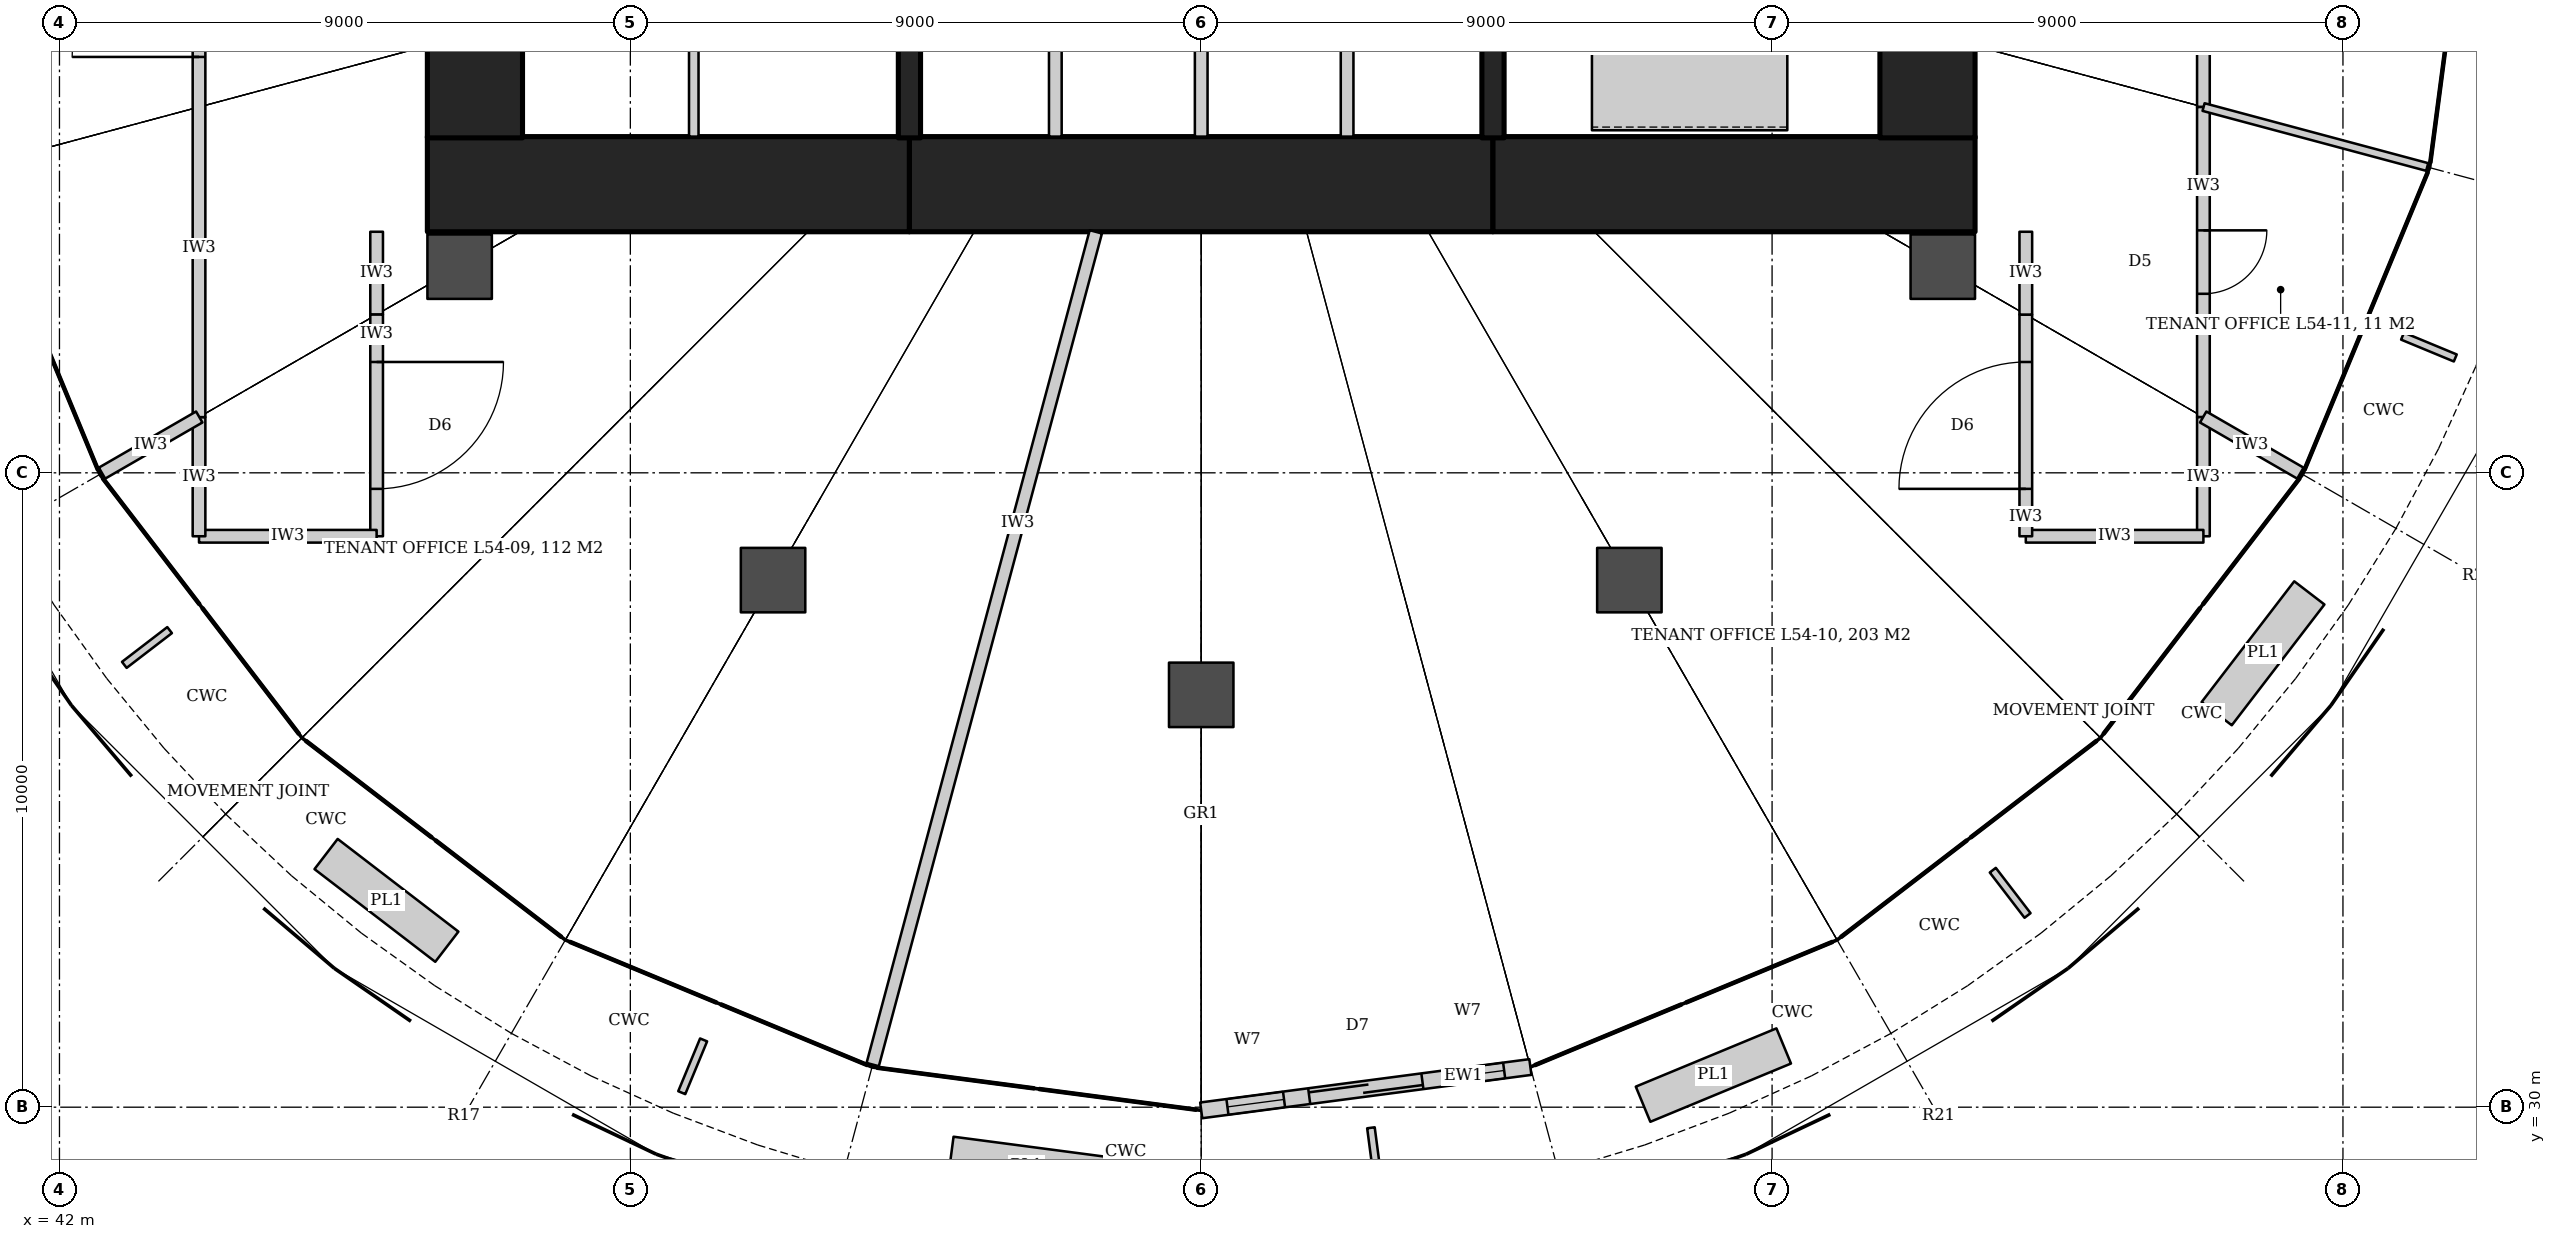
"""IFC4 building model, lengths in metres.
Left out: names, types, materials, properties, quantities, classifications, styles, units other than length and angle.
Written with IfcOpenShell. Run it as: python <this file> out.ifc"""

import sys

from ifc_helpers import new_model, si_unit, direction, frame, frame_2d, origin, origin_2d, place, context, subcontext, project, spatial, rectangle, hollow_circle, extrude, element, fill, save


model = new_model("IFC4")
c1 = context("Model", 3, precision=1e-05, world=origin(), true_north=direction((0.0, 1.0)))
c2 = subcontext(c1, "Body", "Model", "MODEL_VIEW")
j1 = project(units=[si_unit("LENGTHUNIT", "METRE"), si_unit("PLANEANGLEUNIT", "RADIAN")], contexts=[c1])
p1 = place(None, origin())
s1 = spatial("IfcSite", under=j1, at=p1, CompositionType="ELEMENT")
p2 = place(p1, origin())
s2 = spatial("IfcBuilding", under=s1, at=p2, CompositionType="ELEMENT")
p3 = place(p2, frame((0.0, 0.0, 227.6)))
s3 = spatial("IfcBuildingStorey", under=s2, at=p3, CompositionType="ELEMENT", Elevation=227.6)
p4 = place(p3, frame((47.8, 44.55, 0.0), z_axis=(0.0, 0.0, 1.0), x_axis=(1.0, 0.0, 0.0)))
e1 = element("IfcWall", 1, at=p4, inside=s3, PredefinedType="SHEAR", context=c2, shape_type="SweptSolid", body=[
    extrude(rectangle(XDim=7.6, YDim=1.5, at=frame_2d((3.8, 0.0))), origin(), (0.0, 0.0, 1.0), 4.2),
])
p5 = place(p3, frame((55.4, 44.55, 0.0), z_axis=(0.0, 0.0, 1.0), x_axis=(1.0, 0.0, 0.0)))
e2 = element("IfcWall", 2, at=p5, inside=s3, PredefinedType="SHEAR", context=c2, shape_type="SweptSolid", body=[
    extrude(rectangle(XDim=9.2, YDim=1.5, at=frame_2d((4.6, 0.0))), origin(), (0.0, 0.0, 1.0), 4.2),
])
p6 = place(p3, frame((64.6, 44.55, 0.0), z_axis=(0.0, 0.0, 1.0), x_axis=(1.0, 0.0, 0.0)))
e3 = element("IfcWall", 3, at=p6, inside=s3, PredefinedType="SHEAR", context=c2, shape_type="SweptSolid", body=[
    extrude(rectangle(XDim=7.6, YDim=1.5, at=frame_2d((3.8, 0.0))), origin(), (0.0, 0.0, 1.0), 4.2),
])
for number, where, z_axis, x_axis in (
    (4, (71.45, 45.28, 0.0), (0.0, 0.0, 1.0), (0.0, 1.0, 0.0)),
    (5, (48.55, 45.28, 0.0), (0.0, 0.0, 1.0), (0.0, 1.0, 0.0)),
):
    element("IfcWall", number, at=place(p3, frame(where, z_axis=z_axis, x_axis=x_axis)), inside=s3, PredefinedType="SHEAR", context=c2, shape_type="SweptSolid", body=[
        extrude(rectangle(XDim=3.22, YDim=1.5, at=frame_2d((1.61, 0.0))), origin(), (0.0, 0.0, 1.0), 4.2),
    ])
for number, where, z_axis, x_axis in (
    (6, (55.4, 48.345, 0.0), (0.0, 0.0, 1.0), (0.0, -1.0, 0.0)),
    (7, (64.6, 48.345, 0.0), (0.0, 0.0, 1.0), (0.0, -1.0, 0.0)),
):
    element("IfcWall", number, at=place(p3, frame(where, z_axis=z_axis, x_axis=x_axis)), inside=s3, PredefinedType="SHEAR", context=c2, shape_type="SweptSolid", body=[
        extrude(rectangle(XDim=3.065, YDim=0.35, at=frame_2d((1.532, 0.0))), origin(), (0.0, 0.0, 1.0), 4.2),
    ])
for number, where, z_axis, x_axis in (
    (8, (48.309, 43.25, 0.0), (0.0, 0.0, 1.0), (1.0, 0.0, 0.0)),
    (9, (53.25, 38.309, 0.0), (0.0, 0.0, 1.0), (1.0, 0.0, 0.0)),
    (10, (60.0, 36.5, 0.0), (0.0, 0.0, 1.0), (1.0, 0.0, 0.0)),
    (11, (66.75, 38.309, 0.0), (0.0, 0.0, 1.0), (1.0, 0.0, 0.0)),
    (12, (71.691, 43.25, 0.0), (0.0, 0.0, 1.0), (1.0, 0.0, 0.0)),
):
    element("IfcColumn", number, at=place(p3, frame(where, z_axis=z_axis, x_axis=x_axis)), inside=s3, PredefinedType="COLUMN", context=c2, shape_type="SweptSolid", body=[
        extrude(hollow_circle(Radius=0.508, WallThickness=0.05, at=origin_2d()), origin(), (0.0, 0.0, 1.0), 4.2),
    ])
p7 = place(p3, frame((75.8, 50.0, 0.0), z_axis=(0.0, 0.0, 1.0), x_axis=(0.0, -1.0, 0.0)))
e13 = element("IfcWall", 13, at=p7, inside=s3, PredefinedType="PARTITIONING", context=c2, shape_type="SweptSolid", body=[
    extrude(rectangle(XDim=4.234, YDim=0.2, at=frame_2d((2.117, 0.0))), origin(), (0.0, 0.0, 1.0), 3.02),
])
p8 = place(p7, frame((1.617, 0.0, 0.0)))
e14 = element("IfcOpeningElement", 14, at=p8, cuts=e13, PredefinedType="OPENING", context=c2, shape_type="SweptSolid", body=[
    extrude(rectangle(XDim=1.0, YDim=2.4, at=frame_2d((0.5, 1.2))), frame((0.0, 0.11, 0.0), z_axis=(0.0, -1.0, 0.0), x_axis=(1.0, 0.0, 0.0)), (0.0, 0.0, 1.0), 0.22),
])
p9 = place(p3, frame((75.8, 45.766, 0.0), z_axis=(0.0, 0.0, 1.0), x_axis=(0.0, -1.0, 0.0)))
e15 = element("IfcWall", 15, at=p9, inside=s3, PredefinedType="PARTITIONING", context=c2, shape_type="SweptSolid", body=[
    extrude(rectangle(XDim=4.888, YDim=0.2, at=frame_2d((2.444, 0.0))), origin(), (0.0, 0.0, 1.0), 3.02),
])
p10 = place(p9, frame((1.944, 0.0, 0.0)))
e16 = element("IfcOpeningElement", 16, at=p10, cuts=e15, PredefinedType="OPENING", context=c2, shape_type="SweptSolid", body=[
    extrude(rectangle(XDim=1.0, YDim=2.1, at=frame_2d((0.5, 1.05))), frame((0.0, 0.11, 0.0), z_axis=(0.0, -1.0, 0.0), x_axis=(1.0, 0.0, 0.0)), (0.0, 0.0, 1.0), 0.22),
])
p11 = place(p3, frame((75.8, 40.878, 0.0), z_axis=(0.0, 0.0, 1.0), x_axis=(0.0, -1.0, 0.0)))
e17 = element("IfcWall", 17, at=p11, inside=s3, PredefinedType="PARTITIONING", context=c2, shape_type="SweptSolid", body=[
    extrude(rectangle(XDim=1.878, YDim=0.2, at=frame_2d((0.939, 0.0))), origin(), (0.0, 0.0, 1.0), 3.02),
])
p12 = place(p3, frame((75.8, 39.0, 0.0), z_axis=(0.0, 0.0, 1.0), x_axis=(-1.0, 0.0, 0.0)))
e18 = element("IfcWall", 18, at=p12, inside=s3, PredefinedType="PARTITIONING", context=c2, shape_type="SweptSolid", body=[
    extrude(rectangle(XDim=2.8, YDim=0.2, at=frame_2d((1.4, 0.0))), origin(), (0.0, 0.0, 1.0), 3.04),
])
p13 = place(p3, frame((73.0, 39.0, 0.0), z_axis=(0.0, 0.0, 1.0), x_axis=(0.0, 1.0, 0.0)))
e19 = element("IfcWall", 19, at=p13, inside=s3, PredefinedType="PARTITIONING", context=c2, shape_type="SweptSolid", body=[
    extrude(rectangle(XDim=3.494, YDim=0.2, at=frame_2d((1.747, 0.0))), origin(), (0.0, 0.0, 1.0), 3.02),
])
p14 = place(p13, frame((0.747, 0.0, 0.0)))
e20 = element("IfcOpeningElement", 20, at=p14, cuts=e19, PredefinedType="OPENING", context=c2, shape_type="SweptSolid", body=[
    extrude(rectangle(XDim=2.0, YDim=2.1, at=frame_2d((1.0, 1.05))), frame((0.0, 0.11, 0.0), z_axis=(0.0, -1.0, 0.0), x_axis=(1.0, 0.0, 0.0)), (0.0, 0.0, 1.0), 0.22),
])
for number, where, z_axis, x_axis in (
    (21, (73.0, 42.494, 0.0), (0.0, 0.0, 1.0), (0.0, 1.0, 0.0)),
    (22, (47.0, 43.8, 0.0), (0.0, 0.0, 1.0), (0.0, -1.0, 0.0)),
):
    element("IfcWall", number, at=place(p3, frame(where, z_axis=z_axis, x_axis=x_axis)), inside=s3, PredefinedType="PARTITIONING", context=c2, shape_type="SweptSolid", body=[
        extrude(rectangle(XDim=1.306, YDim=0.2, at=frame_2d((0.653, 0.0))), origin(), (0.0, 0.0, 1.0), 3.02),
    ])
p15 = place(p3, frame((47.0, 42.494, 0.0), z_axis=(0.0, 0.0, 1.0), x_axis=(0.0, -1.0, 0.0)))
e23 = element("IfcWall", 23, at=p15, inside=s3, PredefinedType="PARTITIONING", context=c2, shape_type="SweptSolid", body=[
    extrude(rectangle(XDim=3.494, YDim=0.2, at=frame_2d((1.747, 0.0))), origin(), (0.0, 0.0, 1.0), 3.02),
])
p16 = place(p15, frame((0.747, 0.0, 0.0)))
e24 = element("IfcOpeningElement", 24, at=p16, cuts=e23, PredefinedType="OPENING", context=c2, shape_type="SweptSolid", body=[
    extrude(rectangle(XDim=2.0, YDim=2.1, at=frame_2d((1.0, 1.05))), frame((0.0, 0.11, 0.0), z_axis=(0.0, -1.0, 0.0), x_axis=(1.0, 0.0, 0.0)), (0.0, 0.0, 1.0), 0.22),
])
p17 = place(p3, frame((47.0, 39.0, 0.0), z_axis=(0.0, 0.0, 1.0), x_axis=(-1.0, 0.0, 0.0)))
e25 = element("IfcWall", 25, at=p17, inside=s3, PredefinedType="PARTITIONING", context=c2, shape_type="SweptSolid", body=[
    extrude(rectangle(XDim=2.8, YDim=0.2, at=frame_2d((1.4, 0.0))), origin(), (0.0, 0.0, 1.0), 3.04),
])
p18 = place(p3, frame((44.2, 39.0, 0.0), z_axis=(0.0, 0.0, 1.0), x_axis=(0.0, 1.0, 0.0)))
e26 = element("IfcWall", 26, at=p18, inside=s3, PredefinedType="PARTITIONING", context=c2, shape_type="SweptSolid", body=[
    extrude(rectangle(XDim=1.878, YDim=0.2, at=frame_2d((0.939, 0.0))), origin(), (0.0, 0.0, 1.0), 3.02),
])
p19 = place(p3, frame((44.2, 40.878, 0.0), z_axis=(0.0, 0.0, 1.0), x_axis=(0.0, 1.0, 0.0)))
e27 = element("IfcWall", 27, at=p19, inside=s3, PredefinedType="PARTITIONING", context=c2, shape_type="SweptSolid", body=[
    extrude(rectangle(XDim=13.356, YDim=0.2, at=frame_2d((6.678, 0.0))), origin(), (0.0, 0.0, 1.0), 3.02),
])
p20 = place(p19, frame((5.678, 0.0, 0.0)))
e28 = element("IfcOpeningElement", 28, at=p20, cuts=e27, PredefinedType="OPENING", context=c2, shape_type="SweptSolid", body=[
    extrude(rectangle(XDim=2.0, YDim=2.1, at=frame_2d((1.0, 1.05))), frame((0.0, 0.11, 0.0), z_axis=(0.0, -1.0, 0.0), x_axis=(1.0, 0.0, 0.0)), (0.0, 0.0, 1.0), 0.22),
])
p21 = place(p3, frame((44.204, 40.88, 0.0), z_axis=(0.0, 0.0, 1.0), x_axis=(-0.866047089031, -0.499962438169, 0.0)))
e29 = element("IfcWall", 29, at=p21, inside=s3, PredefinedType="PARTITIONING", context=c2, shape_type="SweptSolid", body=[
    extrude(rectangle(XDim=1.82, YDim=0.2, at=frame_2d((0.91, 0.0))), origin(), (0.0, 0.0, 1.0), 3.02),
])
p22 = place(p3, frame((58.338, 43.799, 0.0), z_axis=(0.0, 0.0, 1.0), x_axis=(-0.258816604947, -0.965926480123, 0.0)))
e30 = element("IfcWall", 30, at=p22, inside=s3, PredefinedType="PARTITIONING", context=c2, shape_type="SweptSolid", body=[
    extrude(rectangle(XDim=13.64, YDim=0.2, at=frame_2d((6.82, 0.0))), origin(), (0.0, 0.0, 1.0), 3.02),
])
p23 = place(p3, frame((75.796, 40.88, 0.0), z_axis=(0.0, 0.0, 1.0), x_axis=(0.866047089031, -0.499962438169, 0.0)))
e31 = element("IfcWall", 31, at=p23, inside=s3, PredefinedType="PARTITIONING", context=c2, shape_type="SweptSolid", body=[
    extrude(rectangle(XDim=1.82, YDim=0.2, at=frame_2d((0.91, 0.0))), origin(), (0.0, 0.0, 1.0), 3.02),
])
p24 = place(p3, frame((75.802, 45.766, 0.0), z_axis=(0.0, 0.0, 1.0), x_axis=(0.965934209463, -0.258787756644, 0.0)))
e32 = element("IfcWall", 32, at=p24, inside=s3, PredefinedType="PARTITIONING", context=c2, shape_type="SweptSolid", body=[
    extrude(rectangle(XDim=3.7, YDim=0.125, at=frame_2d((1.85, 0.0))), origin(), (0.0, 0.0, 1.0), 3.02),
])
p25 = place(p3, frame((60.0, 29.9, 0.0), z_axis=(0.0, 0.0, 1.0), x_axis=(0.991440353351, 0.130560429487, 0.0)))
e33 = element("IfcWall", 33, at=p25, inside=s3, PredefinedType="SOLIDWALL", context=c2, shape_type="SweptSolid", body=[
    extrude(rectangle(XDim=5.247, YDim=0.25, at=frame_2d((2.624, 0.0))), origin(), (0.0, 0.0, 1.0), 4.04),
])
p26 = place(p25, frame((1.724, 0.0, 0.0)))
e34 = element("IfcOpeningElement", 34, at=p26, cuts=e33, PredefinedType="OPENING", context=c2, shape_type="SweptSolid", body=[
    extrude(rectangle(XDim=1.8, YDim=2.4, at=frame_2d((0.9, 1.2))), frame((0.0, 0.135, 0.0), z_axis=(0.0, -1.0, 0.0), x_axis=(1.0, 0.0, 0.0)), (0.0, 0.0, 1.0), 0.27),
])
p27 = place(p25, frame((0.424, 0.0, 0.0)))
e35 = element("IfcOpeningElement", 35, at=p27, cuts=e33, PredefinedType="OPENING", context=c2, shape_type="SweptSolid", body=[
    extrude(rectangle(XDim=0.9, YDim=2.4, at=frame_2d((0.45, 1.2))), frame((0.0, 0.135, 0.0), z_axis=(0.0, -1.0, 0.0), x_axis=(1.0, 0.0, 0.0)), (0.0, 0.0, 1.0), 0.27),
])
p28 = place(p25, frame((3.924, 0.0, 0.0)))
e36 = element("IfcOpeningElement", 36, at=p28, cuts=e33, PredefinedType="OPENING", context=c2, shape_type="SweptSolid", body=[
    extrude(rectangle(XDim=0.9, YDim=2.4, at=frame_2d((0.45, 1.2))), frame((0.0, 0.135, 0.0), z_axis=(0.0, -1.0, 0.0), x_axis=(1.0, 0.0, 0.0)), (0.0, 0.0, 1.0), 0.27),
])
for number, where, z_axis, x_axis in (
    (37, (57.7, 45.3, 0.0), (0.0, 0.0, 1.0), (0.0, 1.0, 0.0)),
    (38, (60.0, 45.3, 0.0), (0.0, 0.0, 1.0), (0.0, 1.0, 0.0)),
    (39, (62.3, 45.3, 0.0), (0.0, 0.0, 1.0), (0.0, 1.0, 0.0)),
):
    element("IfcWall", number, at=place(p3, frame(where, z_axis=z_axis, x_axis=x_axis)), inside=s3, PredefinedType="PARTITIONING", context=c2, shape_type="SweptSolid", body=[
        extrude(rectangle(XDim=3.025, YDim=0.2, at=frame_2d((1.512, 0.0))), origin(), (0.0, 0.0, 1.0), 4.2),
    ])
p29 = place(p3, frame((52.0, 45.3, 0.0), z_axis=(0.0, 0.0, 1.0), x_axis=(0.0, 1.0, 0.0)))
e40 = element("IfcWall", 40, at=p29, inside=s3, PredefinedType="PARTITIONING", context=c2, shape_type="SweptSolid", body=[
    extrude(rectangle(XDim=3.025, YDim=0.15, at=frame_2d((1.512, 0.0))), origin(), (0.0, 0.0, 1.0), 4.04),
])
p30 = place(p20, origin())
e41 = element("IfcDoor", 41, at=p30, inside=s3, OperationType="DOUBLE_DOOR_DOUBLE_SWING", PredefinedType="DOOR", context=c2, shape_type="SweptSolid", body=[
    extrude(rectangle(XDim=2.0, YDim=2.1, at=frame_2d((1.0, 1.05))), frame((0.0, 0.025, 0.0), z_axis=(0.0, -1.0, 0.0), x_axis=(1.0, 0.0, 0.0)), (0.0, 0.0, 1.0), 0.05),
])
fill(e28, e41)
p31 = place(p16, origin())
e42 = element("IfcDoor", 42, at=p31, inside=s3, OperationType="DOUBLE_DOOR_DOUBLE_SWING", PredefinedType="DOOR", context=c2, shape_type="SweptSolid", body=[
    extrude(rectangle(XDim=2.0, YDim=2.1, at=frame_2d((1.0, 1.05))), frame((0.0, 0.025, 0.0), z_axis=(0.0, -1.0, 0.0), x_axis=(1.0, 0.0, 0.0)), (0.0, 0.0, 1.0), 0.05),
])
fill(e24, e42)
p32 = place(p14, origin())
e43 = element("IfcDoor", 43, at=p32, inside=s3, OperationType="DOUBLE_DOOR_DOUBLE_SWING", PredefinedType="DOOR", context=c2, shape_type="SweptSolid", body=[
    extrude(rectangle(XDim=2.0, YDim=2.1, at=frame_2d((1.0, 1.05))), frame((0.0, 0.025, 0.0), z_axis=(0.0, -1.0, 0.0), x_axis=(1.0, 0.0, 0.0)), (0.0, 0.0, 1.0), 0.05),
])
fill(e20, e43)
p33 = place(p10, origin())
e44 = element("IfcDoor", 44, at=p33, inside=s3, OperationType="SINGLE_SWING_LEFT", PredefinedType="DOOR", context=c2, shape_type="SweptSolid", body=[
    extrude(rectangle(XDim=1.0, YDim=2.1, at=frame_2d((0.5, 1.05))), frame((0.0, 0.025, 0.0), z_axis=(0.0, -1.0, 0.0), x_axis=(1.0, 0.0, 0.0)), (0.0, 0.0, 1.0), 0.05),
])
fill(e16, e44)
p34 = place(p26, origin())
e45 = element("IfcDoor", 45, at=p34, inside=s3, OperationType="DOUBLE_DOOR_SLIDING", PredefinedType="DOOR", context=c2, shape_type="SweptSolid", body=[
    extrude(rectangle(XDim=1.8, YDim=2.4, at=frame_2d((0.9, 1.2))), frame((0.0, 0.025, 0.0), z_axis=(0.0, -1.0, 0.0), x_axis=(1.0, 0.0, 0.0)), (0.0, 0.0, 1.0), 0.05),
])
fill(e34, e45)
p35 = place(p27, origin())
e46 = element("IfcWindow", 46, at=p35, inside=s3, PartitioningType="SINGLE_PANEL", PredefinedType="WINDOW", context=c2, shape_type="SweptSolid", body=[
    extrude(rectangle(XDim=0.9, YDim=2.4, at=frame_2d((0.45, 1.2))), frame((0.0, 0.03, 0.0), z_axis=(0.0, -1.0, 0.0), x_axis=(1.0, 0.0, 0.0)), (0.0, 0.0, 1.0), 0.06),
])
fill(e35, e46)
p36 = place(p28, origin())
e47 = element("IfcWindow", 47, at=p36, inside=s3, PartitioningType="SINGLE_PANEL", PredefinedType="WINDOW", context=c2, shape_type="SweptSolid", body=[
    extrude(rectangle(XDim=0.9, YDim=2.4, at=frame_2d((0.45, 1.2))), frame((0.0, 0.03, 0.0), z_axis=(0.0, -1.0, 0.0), x_axis=(1.0, 0.0, 0.0)), (0.0, 0.0, 1.0), 0.06),
])
fill(e36, e47)
save(model, sys.argv[1])
